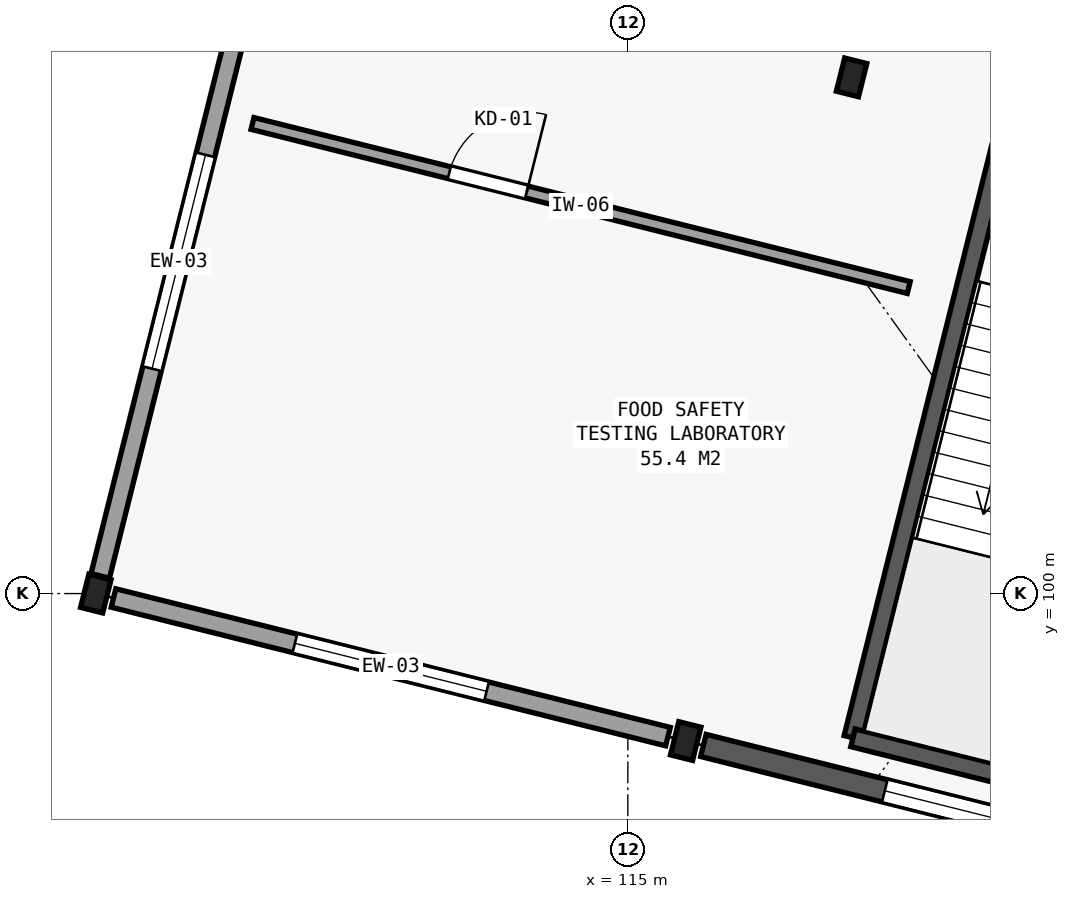
"""IFC4 building model, lengths in metres.
Left out: names, types, materials, properties, quantities, classifications, styles, units other than length and angle.
Written with IfcOpenShell. Run it as: python <this file> out.ifc"""

import sys

from ifc_helpers import new_model, si_unit, direction, frame, frame_2d, origin, origin_2d, place, context, subcontext, project, spatial, rectangle, i_section, extrude, element, fill, save


model = new_model("IFC4")
c1 = context("Model", 3, precision=1e-05, world=origin(), true_north=direction((0.0, 1.0)))
c2 = subcontext(c1, "Body", "Model", "MODEL_VIEW")
j1 = project(units=[si_unit("LENGTHUNIT", "METRE"), si_unit("PLANEANGLEUNIT", "RADIAN")], contexts=[c1])
p1 = place(None, origin())
s1 = spatial("IfcSite", under=j1, at=p1, CompositionType="ELEMENT")
p2 = place(p1, origin())
s2 = spatial("IfcBuilding", under=s1, at=p2, CompositionType="ELEMENT")
p3 = place(p2, frame((0.0, 0.0, 5.4)))
s3 = spatial("IfcBuildingStorey", under=s2, at=p3, CompositionType="ELEMENT", Elevation=5.4)
for number, where, z_axis, x_axis in (
    (1, (108.0, 100.0, 0.0), (0.0, 0.0, 1.0), (0.97, -0.243, 0.0)),
    (2, (115.761, 98.06, 0.0), (0.0, 0.0, 1.0), (0.97, -0.243, 0.0)),
    (3, (117.944, 106.791, 0.0), (0.0, 0.0, 1.0), (0.97, -0.243, 0.0)),
):
    element("IfcColumn", number, at=place(p3, frame(where, z_axis=z_axis, x_axis=x_axis)), inside=s3, PredefinedType="COLUMN", context=c2, shape_type="SweptSolid", body=[
        extrude(i_section(OverallWidth=0.3, OverallDepth=0.45, WebThickness=0.014, FlangeThickness=0.026, FilletRadius=0.027, at=origin_2d()), origin(), (0.0, 0.0, 1.0), 4.5),
    ])
p4 = place(p3, frame((115.528, 98.118, 0.0), z_axis=(0.0, 0.0, 1.0), x_axis=(-0.970138680536, 0.242550902961, 0.0)))
e4 = element("IfcWall", 4, at=p4, inside=s3, PredefinedType="SOLIDWALL", context=c2, shape_type="SweptSolid", body=[
    extrude(rectangle(XDim=7.52, YDim=0.25, at=frame_2d((3.76, 0.0))), origin(), (0.0, 0.0, 1.0), 3.855),
])
p5 = place(p4, frame((2.46, 0.0, 1.05)))
e5 = element("IfcOpeningElement", 5, at=p5, cuts=e4, PredefinedType="OPENING", context=c2, shape_type="SweptSolid", body=[
    extrude(rectangle(XDim=2.6, YDim=1.5, at=frame_2d((1.3, 0.75))), frame((0.0, 0.135, 0.0), z_axis=(0.0, -1.0, 0.0), x_axis=(1.0, 0.0, 0.0)), (0.0, 0.0, 1.0), 0.27),
])
p6 = place(p3, frame((123.29, 96.178, 0.0), z_axis=(0.0, 0.0, 1.0), x_axis=(-0.970148228972, 0.242512708578, 0.0)))
e6 = element("IfcWall", 6, at=p6, inside=s3, PredefinedType="SHEAR", context=c2, shape_type="SweptSolid", body=[
    extrude(rectangle(XDim=7.52, YDim=0.3, at=frame_2d((3.76, 0.0))), origin(), (0.0, 0.0, 1.0), 4.22),
])
p7 = place(p6, frame((2.46, 0.0, 1.05)))
e7 = element("IfcOpeningElement", 7, at=p7, cuts=e6, PredefinedType="OPENING", context=c2, shape_type="SweptSolid", body=[
    extrude(rectangle(XDim=2.6, YDim=1.5, at=frame_2d((1.3, 0.75))), frame((0.0, 0.16, 0.0), z_axis=(0.0, -1.0, 0.0), x_axis=(1.0, 0.0, 0.0)), (0.0, 0.0, 1.0), 0.32),
])
p8 = place(p3, frame((108.058, 100.233, 0.0), z_axis=(0.0, 0.0, 1.0), x_axis=(0.242535625036, 0.970142500145, 0.0)))
e8 = element("IfcWall", 8, at=p8, inside=s3, PredefinedType="SOLIDWALL", context=c2, shape_type="SweptSolid", body=[
    extrude(rectangle(XDim=8.52, YDim=0.25, at=frame_2d((4.26, 0.0))), origin(), (0.0, 0.0, 1.0), 3.805),
])
p9 = place(p8, frame((2.81, 0.0, 1.05)))
e9 = element("IfcOpeningElement", 9, at=p9, cuts=e8, PredefinedType="OPENING", context=c2, shape_type="SweptSolid", body=[
    extrude(rectangle(XDim=2.9, YDim=1.95, at=frame_2d((1.45, 0.975))), frame((0.0, 0.135, 0.0), z_axis=(0.0, -1.0, 0.0), x_axis=(1.0, 0.0, 0.0)), (0.0, 0.0, 1.0), 0.27),
])
p10 = place(p3, frame((117.962, 98.102, 0.0), z_axis=(0.0, 0.0, 1.0), x_axis=(0.242528444268, 0.970144295309, 0.0)))
e10 = element("IfcWall", 10, at=p10, inside=s3, PredefinedType="SOLIDWALL", context=c2, shape_type="SweptSolid", body=[
    extrude(rectangle(XDim=8.0, YDim=0.24, at=frame_2d((4.0, 0.0))), origin(), (0.0, 0.0, 1.0), 4.255),
])
p11 = place(p3, frame((121.6, 97.193, 0.0), z_axis=(0.0, 0.0, 1.0), x_axis=(-0.970131009923, 0.242581581301, 0.0)))
e11 = element("IfcWall", 11, at=p11, inside=s3, PredefinedType="SOLIDWALL", context=c2, shape_type="SweptSolid", body=[
    extrude(rectangle(XDim=3.75, YDim=0.24, at=frame_2d((1.875, 0.0))), origin(), (0.0, 0.0, 1.0), 4.255),
])
p12 = place(p3, frame((111.449, 111.734, 0.0), z_axis=(0.0, 0.0, 1.0), x_axis=(0.97014286372, -0.242534170733, 0.0)))
e12 = element("IfcWall", 12, at=p12, inside=s3, PredefinedType="PARTITIONING", context=c2, shape_type="SweptSolid", body=[
    extrude(rectangle(XDim=39.5, YDim=0.16, at=frame_2d((19.75, 0.0))), origin(), (0.0, 0.0, 1.0), 3.64),
])
p13 = place(p12, frame((19.225, 0.0, 0.0)))
e13 = element("IfcOpeningElement", 13, at=p13, cuts=e12, PredefinedType="OPENING", context=c2, shape_type="SweptSolid", body=[
    extrude(rectangle(XDim=1.05, YDim=2.15, at=frame_2d((0.525, 1.075))), frame((0.0, 0.09, 0.0), z_axis=(0.0, -1.0, 0.0), x_axis=(1.0, 0.0, 0.0)), (0.0, 0.0, 1.0), 0.18),
])
p14 = place(p3, frame((110.062, 106.185, 0.0), z_axis=(0.0, 0.0, 1.0), x_axis=(0.970145727306, -0.24252271603, 0.0)))
e14 = element("IfcWall", 14, at=p14, inside=s3, PredefinedType="PARTITIONING", context=c2, shape_type="SweptSolid", body=[
    extrude(rectangle(XDim=8.9, YDim=0.16, at=frame_2d((4.45, 0.0))), origin(), (0.0, 0.0, 1.0), 3.64),
])
p15 = place(p14, frame((2.669, 0.0, 0.0)))
e15 = element("IfcOpeningElement", 15, at=p15, cuts=e14, PredefinedType="OPENING", context=c2, shape_type="SweptSolid", body=[
    extrude(rectangle(XDim=1.05, YDim=2.15, at=frame_2d((0.525, 1.075))), frame((0.0, 0.09, 0.0), z_axis=(0.0, -1.0, 0.0), x_axis=(1.0, 0.0, 0.0)), (0.0, 0.0, 1.0), 0.18),
])
p16 = place(p5, origin())
e16 = element("IfcWindow", 16, at=p16, inside=s3, PartitioningType="SINGLE_PANEL", PredefinedType="WINDOW", context=c2, shape_type="SweptSolid", body=[
    extrude(rectangle(XDim=2.6, YDim=1.5, at=frame_2d((1.3, 0.75))), frame((0.0, 0.03, 0.0), z_axis=(0.0, -1.0, 0.0), x_axis=(1.0, 0.0, 0.0)), (0.0, 0.0, 1.0), 0.06),
])
fill(e5, e16)
p17 = place(p7, origin())
e17 = element("IfcWindow", 17, at=p17, inside=s3, PartitioningType="SINGLE_PANEL", PredefinedType="WINDOW", context=c2, shape_type="SweptSolid", body=[
    extrude(rectangle(XDim=2.6, YDim=1.5, at=frame_2d((1.3, 0.75))), frame((0.0, 0.03, 0.0), z_axis=(0.0, -1.0, 0.0), x_axis=(1.0, 0.0, 0.0)), (0.0, 0.0, 1.0), 0.06),
])
fill(e7, e17)
p18 = place(p9, origin())
e18 = element("IfcWindow", 18, at=p18, inside=s3, PartitioningType="SINGLE_PANEL", PredefinedType="WINDOW", context=c2, shape_type="SweptSolid", body=[
    extrude(rectangle(XDim=2.9, YDim=1.95, at=frame_2d((1.45, 0.975))), frame((0.0, 0.03, 0.0), z_axis=(0.0, -1.0, 0.0), x_axis=(1.0, 0.0, 0.0)), (0.0, 0.0, 1.0), 0.06),
])
fill(e9, e18)
p19 = place(p15, origin())
e19 = element("IfcDoor", 19, at=p19, inside=s3, OperationType="SINGLE_SWING_RIGHT", PredefinedType="DOOR", context=c2, shape_type="SweptSolid", body=[
    extrude(rectangle(XDim=1.05, YDim=2.15, at=frame_2d((0.525, 1.075))), frame((0.0, 0.025, 0.0), z_axis=(0.0, -1.0, 0.0), x_axis=(1.0, 0.0, 0.0)), (0.0, 0.0, 1.0), 0.05),
])
fill(e15, e19)
save(model, sys.argv[1])
